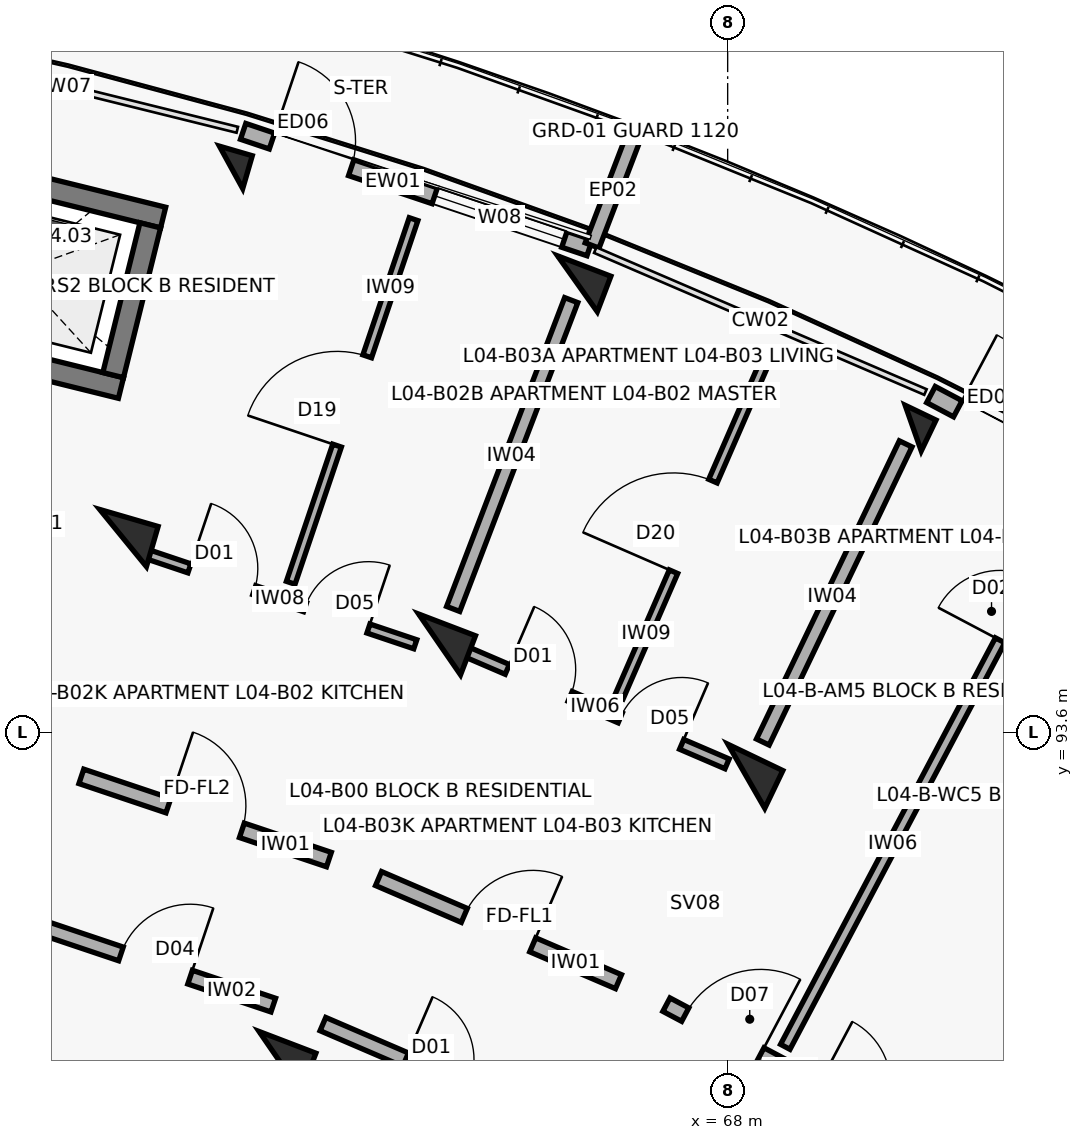
"""IFC4 building model, lengths in metres.
Left out: names, types, materials, properties, quantities, classifications, styles, units other than length and angle.
Written with IfcOpenShell. Run it as: python <this file> out.ifc"""

import sys

from ifc_helpers import new_model, si_unit, direction, frame, frame_2d, origin, origin_2d, place, context, subcontext, project, spatial, rectangle, extrude, element, fill, save


model = new_model("IFC4")
c1 = context("Model", 3, precision=1e-05, world=origin(), true_north=direction((0.0, 1.0)))
c2 = subcontext(c1, "Body", "Model", "MODEL_VIEW")
j1 = project(units=[si_unit("LENGTHUNIT", "METRE"), si_unit("PLANEANGLEUNIT", "RADIAN")], contexts=[c1])
p1 = place(None, origin())
s1 = spatial("IfcSite", under=j1, at=p1, CompositionType="ELEMENT")
p2 = place(p1, origin())
s2 = spatial("IfcBuilding", under=s1, at=p2, CompositionType="ELEMENT")
p3 = place(p2, frame((0.0, 0.0, 14.3)))
s3 = spatial("IfcBuildingStorey", under=s2, at=p3, CompositionType="ELEMENT", Elevation=14.3)
p4 = place(p3, frame((60.046, 96.153, 0.0), z_axis=(0.0, 0.0, 1.0), x_axis=(0.27966144946, 0.96009867914, 0.0)))
e1 = element("IfcColumn", 1, at=p4, inside=s3, PredefinedType="COLUMN", context=c2, shape_type="SweptSolid", body=[
    extrude(rectangle(XDim=0.55, YDim=0.8, at=origin_2d()), origin(), (0.0, 0.0, 1.0), 3.1),
])
p5 = place(p3, frame((61.467, 101.031, 0.0), z_axis=(0.0, 0.0, 1.0), x_axis=(0.27966144946, 0.96009867914, 0.0)))
e2 = element("IfcColumn", 2, at=p5, inside=s3, PredefinedType="COLUMN", context=c2, shape_type="SweptSolid", body=[
    extrude(rectangle(XDim=0.45, YDim=0.45, at=origin_2d()), origin(), (0.0, 0.0, 1.0), 3.1),
])
for number, where, z_axis, x_axis in (
    (3, (62.111, 89.261, 0.0), (0.0, 0.0, 1.0), (0.357, 0.934, 0.0)),
    (4, (64.21, 94.753, 0.0), (0.0, 0.0, 1.0), (0.357, 0.934, 0.0)),
):
    element("IfcColumn", number, at=place(p3, frame(where, z_axis=z_axis, x_axis=x_axis)), inside=s3, PredefinedType="COLUMN", context=c2, shape_type="SweptSolid", body=[
        extrude(rectangle(XDim=0.55, YDim=0.8, at=origin_2d()), origin(), (0.0, 0.0, 1.0), 3.1),
    ])
p6 = place(p3, frame((66.024, 99.499, 0.0), z_axis=(0.0, 0.0, 1.0), x_axis=(0.357064076459, 0.934079892355, 0.0)))
e5 = element("IfcColumn", 5, at=p6, inside=s3, PredefinedType="COLUMN", context=c2, shape_type="SweptSolid", body=[
    extrude(rectangle(XDim=0.5, YDim=0.75, at=origin_2d()), origin(), (0.0, 0.0, 1.0), 3.1),
])
p7 = place(p3, frame((68.246, 93.019, 0.0), z_axis=(0.0, 0.0, 1.0), x_axis=(0.432085748802, 0.901832526405, 0.0)))
e6 = element("IfcColumn", 6, at=p7, inside=s3, PredefinedType="COLUMN", context=c2, shape_type="SweptSolid", body=[
    extrude(rectangle(XDim=0.55, YDim=0.8, at=origin_2d()), origin(), (0.0, 0.0, 1.0), 3.1),
])
p8 = place(p3, frame((70.441, 97.6, 0.0), z_axis=(0.0, 0.0, 1.0), x_axis=(0.432085748802, 0.901832526405, 0.0)))
e7 = element("IfcColumn", 7, at=p8, inside=s3, PredefinedType="COLUMN", context=c2, shape_type="SweptSolid", body=[
    extrude(rectangle(XDim=0.45, YDim=0.45, at=origin_2d()), origin(), (0.0, 0.0, 1.0), 3.1),
])
p9 = place(p3, frame((61.625, 101.504, 0.0), z_axis=(0.0, 0.0, 1.0), x_axis=(0.947867898788, -0.318663531717, 0.0)))
e8 = element("IfcWall", 8, at=p9, inside=s3, PredefinedType="SOLIDWALL", context=c2, shape_type="SweptSolid", body=[
    extrude(rectangle(XDim=4.809, YDim=0.22, at=frame_2d((2.405, 0.0))), origin(), (0.0, 0.0, 1.0), 2.25),
])
p10 = place(p9, frame((0.4, 0.0, 0.0)))
e9 = element("IfcOpeningElement", 9, at=p10, cuts=e8, PredefinedType="OPENING", context=c2, shape_type="SweptSolid", body=[
    extrude(rectangle(XDim=1.1, YDim=2.15, at=frame_2d((0.55, 1.075))), frame((0.0, 0.12, 0.0), z_axis=(0.0, -1.0, 0.0), x_axis=(1.0, 0.0, 0.0)), (0.0, 0.0, 1.0), 0.24),
])
p11 = place(p9, frame((2.659, 0.0, 0.35)))
e10 = element("IfcOpeningElement", 10, at=p11, cuts=e8, PredefinedType="OPENING", context=c2, shape_type="SweptSolid", body=[
    extrude(rectangle(XDim=1.8, YDim=1.65, at=frame_2d((0.9, 0.825))), frame((0.0, 0.12, 0.0), z_axis=(0.0, -1.0, 0.0), x_axis=(1.0, 0.0, 0.0)), (0.0, 0.0, 1.0), 0.24),
])
p12 = place(p3, frame((66.217, 100.003, 0.0), z_axis=(0.0, 0.0, 1.0), x_axis=(0.356957296461, 0.934120703391, 0.0)))
e11 = element("IfcWall", 11, at=p12, inside=s3, PredefinedType="PARAPET", context=c2, shape_type="SweptSolid", body=[
    extrude(rectangle(XDim=1.53, YDim=0.195, at=frame_2d((0.765, 0.0))), origin(), (0.0, 0.0, 1.0), 2.25),
])
p13 = place(p3, frame((70.675, 98.042, 0.0), z_axis=(0.0, 0.0, 1.0), x_axis=(0.883448093208, -0.468529045639, 0.0)))
e12 = element("IfcWall", 12, at=p13, inside=s3, PredefinedType="SOLIDWALL", context=c2, shape_type="SweptSolid", body=[
    extrude(rectangle(XDim=4.809, YDim=0.24, at=frame_2d((2.405, 0.0))), origin(), (0.0, 0.0, 1.0), 2.25),
])
p14 = place(p13, frame((0.4, 0.0, 0.0)))
e13 = element("IfcOpeningElement", 13, at=p14, cuts=e12, PredefinedType="OPENING", context=c2, shape_type="SweptSolid", body=[
    extrude(rectangle(XDim=1.1, YDim=2.15, at=frame_2d((0.55, 1.075))), frame((0.0, 0.13, 0.0), z_axis=(0.0, -1.0, 0.0), x_axis=(1.0, 0.0, 0.0)), (0.0, 0.0, 1.0), 0.26),
])
p15 = place(p13, frame((2.659, 0.0, 0.35)))
e14 = element("IfcOpeningElement", 14, at=p15, cuts=e12, PredefinedType="OPENING", context=c2, shape_type="SweptSolid", body=[
    extrude(rectangle(XDim=1.8, YDim=1.65, at=frame_2d((0.9, 0.825))), frame((0.0, 0.13, 0.0), z_axis=(0.0, -1.0, 0.0), x_axis=(1.0, 0.0, 0.0)), (0.0, 0.0, 1.0), 0.26),
])
p16 = place(p3, frame((60.018, 98.128, 0.0), z_axis=(0.0, 0.0, 1.0), x_axis=(-0.970707542441, 0.240264160972, 0.0)))
e15 = element("IfcWall", 15, at=p16, inside=s3, PredefinedType="SHEAR", context=c2, shape_type="SweptSolid", body=[
    extrude(rectangle(XDim=3.39, YDim=0.28, at=frame_2d((1.695, 0.0))), origin(), (0.0, 0.0, 1.0), 3.1),
])
p17 = place(p16, frame((1.095, 0.0, 0.0)))
e16 = element("IfcOpeningElement", 16, at=p17, cuts=e15, PredefinedType="OPENING", context=c2, shape_type="SweptSolid", body=[
    extrude(rectangle(XDim=1.2, YDim=2.15, at=frame_2d((0.6, 1.075))), frame((0.0, 0.15, 0.0), z_axis=(0.0, -1.0, 0.0), x_axis=(1.0, 0.0, 0.0)), (0.0, 0.0, 1.0), 0.3),
])
p18 = place(p3, frame((60.573, 100.37, 0.0), z_axis=(0.0, 0.0, 1.0), x_axis=(-0.970711699588, 0.240247364777, 0.0)))
e17 = element("IfcWall", 17, at=p18, inside=s3, PredefinedType="SHEAR", context=c2, shape_type="SweptSolid", body=[
    extrude(rectangle(XDim=3.39, YDim=0.28, at=frame_2d((1.695, 0.0))), origin(), (0.0, 0.0, 1.0), 3.1),
])
p19 = place(p3, frame((59.915, 98.297, 0.0), z_axis=(0.0, 0.0, 1.0), x_axis=(0.2402993748, 0.970698825832, 0.0)))
e18 = element("IfcWall", 18, at=p19, inside=s3, PredefinedType="SHEAR", context=c2, shape_type="SweptSolid", body=[
    extrude(rectangle(XDim=2.03, YDim=0.28, at=frame_2d((1.015, 0.0))), origin(), (0.0, 0.0, 1.0), 3.1),
])
p20 = place(p3, frame((59.497, 93.018, 0.0), z_axis=(0.0, 0.0, 1.0), x_axis=(0.947863007629, -0.318678080151, 0.0)))
e19 = element("IfcWall", 19, at=p20, inside=s3, PredefinedType="SOLIDWALL", context=c2, shape_type="SweptSolid", body=[
    extrude(rectangle(XDim=3.436, YDim=0.2, at=frame_2d((1.718, 0.0))), origin(), (0.0, 0.0, 1.0), 2.08),
])
p21 = place(p20, frame((1.208, 0.0, 0.0)))
e20 = element("IfcOpeningElement", 20, at=p21, cuts=e19, PredefinedType="OPENING", context=c2, shape_type="SweptSolid", body=[
    extrude(rectangle(XDim=1.02, YDim=2.15, at=frame_2d((0.51, 1.075))), frame((0.0, 0.11, 0.0), z_axis=(0.0, -1.0, 0.0), x_axis=(1.0, 0.0, 0.0)), (0.0, 0.0, 1.0), 0.22),
])
p22 = place(p3, frame((58.923, 91.049, 0.0), z_axis=(0.0, 0.0, 1.0), x_axis=(0.94787351033, -0.318646839643, 0.0)))
e21 = element("IfcWall", 21, at=p22, inside=s3, PredefinedType="SOLIDWALL", context=c2, shape_type="SweptSolid", body=[
    extrude(rectangle(XDim=3.269, YDim=0.19, at=frame_2d((1.634, 0.0))), origin(), (0.0, 0.0, 1.0), 2.08),
])
p23 = place(p22, frame((1.154, 0.0, 0.0)))
e22 = element("IfcOpeningElement", 22, at=p23, cuts=e21, PredefinedType="OPENING", context=c2, shape_type="SweptSolid", body=[
    extrude(rectangle(XDim=0.96, YDim=2.1, at=frame_2d((0.48, 1.05))), frame((0.0, 0.105, 0.0), z_axis=(0.0, -1.0, 0.0), x_axis=(1.0, 0.0, 0.0)), (0.0, 0.0, 1.0), 0.21),
])
p24 = place(p3, frame((60.302, 95.962, 0.0), z_axis=(0.0, 0.0, 1.0), x_axis=(0.947873924847, -0.318645606584, 0.0)))
e23 = element("IfcWall", 23, at=p24, inside=s3, PredefinedType="PARTITIONING", context=c2, shape_type="SweptSolid", body=[
    extrude(rectangle(XDim=3.785, YDim=0.125, at=frame_2d((1.893, 0.0))), origin(), (0.0, 0.0, 1.0), 2.08),
])
p25 = place(p24, frame((0.65, 0.0, 0.0)))
e24 = element("IfcOpeningElement", 24, at=p25, cuts=e23, PredefinedType="OPENING", context=c2, shape_type="SweptSolid", body=[
    extrude(rectangle(XDim=0.9, YDim=2.1, at=frame_2d((0.45, 1.05))), frame((0.0, 0.073, 0.0), z_axis=(0.0, -1.0, 0.0), x_axis=(1.0, 0.0, 0.0)), (0.0, 0.0, 1.0), 0.145),
])
p26 = place(p24, frame((2.255, 0.0, 0.0)))
e25 = element("IfcOpeningElement", 25, at=p26, cuts=e23, PredefinedType="OPENING", context=c2, shape_type="SweptSolid", body=[
    extrude(rectangle(XDim=0.88, YDim=2.1, at=frame_2d((0.44, 1.05))), frame((0.0, 0.073, 0.0), z_axis=(0.0, -1.0, 0.0), x_axis=(1.0, 0.0, 0.0)), (0.0, 0.0, 1.0), 0.145),
])
p27 = place(p3, frame((62.251, 95.565, 0.0), z_axis=(0.0, 0.0, 1.0), x_axis=(0.32008297059, 0.94738951437, 0.0)))
e26 = element("IfcWall", 26, at=p27, inside=s3, PredefinedType="PARTITIONING", context=c2, shape_type="SweptSolid", body=[
    extrude(rectangle(XDim=5.05, YDim=0.12, at=frame_2d((2.525, 0.0))), origin(), (0.0, 0.0, 1.0), 2.08),
])
p28 = place(p27, frame((1.905, 0.0, 0.0)))
e27 = element("IfcOpeningElement", 27, at=p28, cuts=e26, PredefinedType="OPENING", context=c2, shape_type="SweptSolid", body=[
    extrude(rectangle(XDim=1.24, YDim=2.1, at=frame_2d((0.62, 1.05))), frame((0.0, 0.07, 0.0), z_axis=(0.0, -1.0, 0.0), x_axis=(1.0, 0.0, 0.0)), (0.0, 0.0, 1.0), 0.14),
])
p29 = place(p3, frame((63.407, 91.673, 0.0), z_axis=(0.0, 0.0, 1.0), x_axis=(0.918718172399, -0.394913813008, 0.0)))
e28 = element("IfcWall", 28, at=p29, inside=s3, PredefinedType="SOLIDWALL", context=c2, shape_type="SweptSolid", body=[
    extrude(rectangle(XDim=3.436, YDim=0.2, at=frame_2d((1.718, 0.0))), origin(), (0.0, 0.0, 1.0), 2.08),
])
p30 = place(p29, frame((1.228, 0.0, 0.0)))
e29 = element("IfcOpeningElement", 29, at=p30, cuts=e28, PredefinedType="OPENING", context=c2, shape_type="SweptSolid", body=[
    extrude(rectangle(XDim=0.98, YDim=2.15, at=frame_2d((0.49, 1.075))), frame((0.0, 0.11, 0.0), z_axis=(0.0, -1.0, 0.0), x_axis=(1.0, 0.0, 0.0)), (0.0, 0.0, 1.0), 0.22),
])
p31 = place(p3, frame((62.675, 89.758, 0.0), z_axis=(0.0, 0.0, 1.0), x_axis=(0.918723391052, -0.394901672235, 0.0)))
e30 = element("IfcWall", 30, at=p31, inside=s3, PredefinedType="SOLIDWALL", context=c2, shape_type="SweptSolid", body=[
    extrude(rectangle(XDim=3.269, YDim=0.19, at=frame_2d((1.634, 0.0))), origin(), (0.0, 0.0, 1.0), 2.08),
])
p32 = place(p31, frame((1.184, 0.0, 0.0)))
e31 = element("IfcOpeningElement", 31, at=p32, cuts=e30, PredefinedType="OPENING", context=c2, shape_type="SweptSolid", body=[
    extrude(rectangle(XDim=0.9, YDim=2.1, at=frame_2d((0.45, 1.05))), frame((0.0, 0.105, 0.0), z_axis=(0.0, -1.0, 0.0), x_axis=(1.0, 0.0, 0.0)), (0.0, 0.0, 1.0), 0.21),
])
p33 = place(p3, frame((64.503, 94.682, 0.0), z_axis=(0.0, 0.0, 1.0), x_axis=(0.918732171064, -0.394881245253, 0.0)))
e32 = element("IfcWall", 32, at=p33, inside=s3, PredefinedType="PARTITIONING", context=c2, shape_type="SweptSolid", body=[
    extrude(rectangle(XDim=3.797, YDim=0.14, at=frame_2d((1.899, 0.0))), origin(), (0.0, 0.0, 1.0), 2.08),
])
p34 = place(p33, frame((0.65, 0.0, 0.0)))
e33 = element("IfcOpeningElement", 33, at=p34, cuts=e32, PredefinedType="OPENING", context=c2, shape_type="SweptSolid", body=[
    extrude(rectangle(XDim=0.9, YDim=2.1, at=frame_2d((0.45, 1.05))), frame((0.0, 0.08, 0.0), z_axis=(0.0, -1.0, 0.0), x_axis=(1.0, 0.0, 0.0)), (0.0, 0.0, 1.0), 0.16),
])
p35 = place(p33, frame((2.267, 0.0, 0.0)))
e34 = element("IfcOpeningElement", 34, at=p35, cuts=e32, PredefinedType="OPENING", context=c2, shape_type="SweptSolid", body=[
    extrude(rectangle(XDim=0.88, YDim=2.1, at=frame_2d((0.44, 1.05))), frame((0.0, 0.08, 0.0), z_axis=(0.0, -1.0, 0.0), x_axis=(1.0, 0.0, 0.0)), (0.0, 0.0, 1.0), 0.16),
])
p36 = place(p3, frame((66.569, 94.06, 0.0), z_axis=(0.0, 0.0, 1.0), x_axis=(0.399048563147, 0.916929792433, 0.0)))
e35 = element("IfcWall", 35, at=p36, inside=s3, PredefinedType="PARTITIONING", context=c2, shape_type="SweptSolid", body=[
    extrude(rectangle(XDim=4.9, YDim=0.12, at=frame_2d((2.45, 0.0))), origin(), (0.0, 0.0, 1.0), 2.08),
])
p37 = place(p36, frame((1.8, 0.0, 0.0)))
e36 = element("IfcOpeningElement", 36, at=p37, cuts=e35, PredefinedType="OPENING", context=c2, shape_type="SweptSolid", body=[
    extrude(rectangle(XDim=1.3, YDim=2.1, at=frame_2d((0.65, 1.05))), frame((0.0, 0.07, 0.0), z_axis=(0.0, -1.0, 0.0), x_axis=(1.0, 0.0, 0.0)), (0.0, 0.0, 1.0), 0.14),
])
p38 = place(p3, frame((64.389, 95.22, 0.0), z_axis=(0.0, 0.0, 1.0), x_axis=(0.357064016205, 0.934079915388, 0.0)))
e37 = element("IfcWall", 37, at=p38, inside=s3, PredefinedType="SOLIDWALL", context=c2, shape_type="SweptSolid", body=[
    extrude(rectangle(XDim=4.35, YDim=0.185, at=frame_2d((2.175, 0.0))), origin(), (0.0, 0.0, 1.0), 2.08),
])
p39 = place(p3, frame((67.194, 90.014, 0.0), z_axis=(0.0, 0.0, 1.0), x_axis=(0.883410853063, -0.468599258099, 0.0)))
e38 = element("IfcWall", 38, at=p39, inside=s3, PredefinedType="SOLIDWALL", context=c2, shape_type="SweptSolid", body=[
    extrude(rectangle(XDim=3.436, YDim=0.2, at=frame_2d((1.718, 0.0))), origin(), (0.0, 0.0, 1.0), 2.08),
])
p40 = place(p39, frame((0.28, 0.0, 0.0)))
e39 = element("IfcOpeningElement", 39, at=p40, cuts=e38, PredefinedType="OPENING", context=c2, shape_type="SweptSolid", body=[
    extrude(rectangle(XDim=1.12, YDim=2.15, at=frame_2d((0.56, 1.075))), frame((0.0, 0.11, 0.0), z_axis=(0.0, -1.0, 0.0), x_axis=(1.0, 0.0, 0.0)), (0.0, 0.0, 1.0), 0.22),
])
p41 = place(p39, frame((2.266, 0.0, 0.0)))
e40 = element("IfcOpeningElement", 40, at=p41, cuts=e38, PredefinedType="OPENING", context=c2, shape_type="SweptSolid", body=[
    extrude(rectangle(XDim=0.95, YDim=2.1, at=frame_2d((0.475, 1.05))), frame((0.0, 0.11, 0.0), z_axis=(0.0, -1.0, 0.0), x_axis=(1.0, 0.0, 0.0)), (0.0, 0.0, 1.0), 0.22),
])
p42 = place(p3, frame((68.758, 89.459, 0.0), z_axis=(0.0, 0.0, 1.0), x_axis=(0.467208910392, 0.884146952746, 0.0)))
e41 = element("IfcWall", 41, at=p42, inside=s3, PredefinedType="PARTITIONING", context=c2, shape_type="SweptSolid", body=[
    extrude(rectangle(XDim=7.95, YDim=0.14, at=frame_2d((3.975, 0.0))), origin(), (0.0, 0.0, 1.0), 2.08),
])
p43 = place(p42, frame((6.05, 0.0, 0.0)))
e42 = element("IfcOpeningElement", 42, at=p43, cuts=e41, PredefinedType="OPENING", context=c2, shape_type="SweptSolid", body=[
    extrude(rectangle(XDim=0.92, YDim=2.1, at=frame_2d((0.46, 1.05))), frame((0.0, 0.08, 0.0), z_axis=(0.0, -1.0, 0.0), x_axis=(1.0, 0.0, 0.0)), (0.0, 0.0, 1.0), 0.16),
])
p44 = place(p3, frame((68.462, 93.469, 0.0), z_axis=(0.0, 0.0, 1.0), x_axis=(0.432086898897, 0.901831975371, 0.0)))
e43 = element("IfcWall", 43, at=p44, inside=s3, PredefinedType="SOLIDWALL", context=c2, shape_type="SweptSolid", body=[
    extrude(rectangle(XDim=4.35, YDim=0.185, at=frame_2d((2.175, 0.0))), origin(), (0.0, 0.0, 1.0), 2.08),
])
p45 = place(p10, origin())
e44 = element("IfcDoor", 44, at=p45, inside=s3, OperationType="SINGLE_SWING_LEFT", PredefinedType="DOOR", context=c2, shape_type="SweptSolid", body=[
    extrude(rectangle(XDim=1.1, YDim=2.15, at=frame_2d((0.55, 1.075))), frame((0.0, 0.025, 0.0), z_axis=(0.0, -1.0, 0.0), x_axis=(1.0, 0.0, 0.0)), (0.0, 0.0, 1.0), 0.05),
])
fill(e9, e44)
p46 = place(p11, origin())
e45 = element("IfcWindow", 45, at=p46, inside=s3, PartitioningType="TRIPLE_PANEL_VERTICAL", PredefinedType="WINDOW", context=c2, shape_type="SweptSolid", body=[
    extrude(rectangle(XDim=1.8, YDim=1.65, at=frame_2d((0.9, 0.825))), frame((0.0, 0.03, 0.0), z_axis=(0.0, -1.0, 0.0), x_axis=(1.0, 0.0, 0.0)), (0.0, 0.0, 1.0), 0.06),
])
fill(e10, e45)
p47 = place(p14, origin())
e46 = element("IfcDoor", 46, at=p47, inside=s3, OperationType="SINGLE_SWING_LEFT", PredefinedType="DOOR", context=c2, shape_type="SweptSolid", body=[
    extrude(rectangle(XDim=1.1, YDim=2.15, at=frame_2d((0.55, 1.075))), frame((0.0, 0.025, 0.0), z_axis=(0.0, -1.0, 0.0), x_axis=(1.0, 0.0, 0.0)), (0.0, 0.0, 1.0), 0.05),
])
fill(e13, e46)
p48 = place(p21, origin())
e47 = element("IfcDoor", 47, at=p48, inside=s3, OperationType="SINGLE_SWING_LEFT", PredefinedType="DOOR", context=c2, shape_type="SweptSolid", body=[
    extrude(rectangle(XDim=1.02, YDim=2.15, at=frame_2d((0.51, 1.075))), frame((0.0, 0.025, 0.0), z_axis=(0.0, -1.0, 0.0), x_axis=(1.0, 0.0, 0.0)), (0.0, 0.0, 1.0), 0.05),
])
fill(e20, e47)
p49 = place(p23, origin())
e48 = element("IfcDoor", 48, at=p49, inside=s3, OperationType="SINGLE_SWING_RIGHT", PredefinedType="DOOR", context=c2, shape_type="SweptSolid", body=[
    extrude(rectangle(XDim=0.96, YDim=2.1, at=frame_2d((0.48, 1.05))), frame((0.0, 0.025, 0.0), z_axis=(0.0, -1.0, 0.0), x_axis=(1.0, 0.0, 0.0)), (0.0, 0.0, 1.0), 0.05),
])
fill(e22, e48)
p50 = place(p25, origin())
e49 = element("IfcDoor", 49, at=p50, inside=s3, OperationType="SINGLE_SWING_LEFT", PredefinedType="DOOR", context=c2, shape_type="SweptSolid", body=[
    extrude(rectangle(XDim=0.9, YDim=2.1, at=frame_2d((0.45, 1.05))), frame((0.0, 0.025, 0.0), z_axis=(0.0, -1.0, 0.0), x_axis=(1.0, 0.0, 0.0)), (0.0, 0.0, 1.0), 0.05),
])
fill(e24, e49)
p51 = place(p26, origin())
e50 = element("IfcDoor", 50, at=p51, inside=s3, OperationType="SINGLE_SWING_RIGHT", PredefinedType="DOOR", context=c2, shape_type="SweptSolid", body=[
    extrude(rectangle(XDim=0.88, YDim=2.1, at=frame_2d((0.44, 1.05))), frame((0.0, 0.025, 0.0), z_axis=(0.0, -1.0, 0.0), x_axis=(1.0, 0.0, 0.0)), (0.0, 0.0, 1.0), 0.05),
])
fill(e25, e50)
p52 = place(p28, origin())
e51 = element("IfcDoor", 51, at=p52, inside=s3, OperationType="SINGLE_SWING_LEFT", PredefinedType="DOOR", context=c2, shape_type="SweptSolid", body=[
    extrude(rectangle(XDim=1.24, YDim=2.1, at=frame_2d((0.62, 1.05))), frame((0.0, 0.025, 0.0), z_axis=(0.0, -1.0, 0.0), x_axis=(1.0, 0.0, 0.0)), (0.0, 0.0, 1.0), 0.05),
])
fill(e27, e51)
p53 = place(p30, origin())
e52 = element("IfcDoor", 52, at=p53, inside=s3, OperationType="SINGLE_SWING_RIGHT", PredefinedType="DOOR", context=c2, shape_type="SweptSolid", body=[
    extrude(rectangle(XDim=0.98, YDim=2.15, at=frame_2d((0.49, 1.075))), frame((0.0, 0.025, 0.0), z_axis=(0.0, -1.0, 0.0), x_axis=(1.0, 0.0, 0.0)), (0.0, 0.0, 1.0), 0.05),
])
fill(e29, e52)
p54 = place(p32, origin())
e53 = element("IfcDoor", 53, at=p54, inside=s3, OperationType="SINGLE_SWING_LEFT", PredefinedType="DOOR", context=c2, shape_type="SweptSolid", body=[
    extrude(rectangle(XDim=0.9, YDim=2.1, at=frame_2d((0.45, 1.05))), frame((0.0, 0.025, 0.0), z_axis=(0.0, -1.0, 0.0), x_axis=(1.0, 0.0, 0.0)), (0.0, 0.0, 1.0), 0.05),
])
fill(e31, e53)
p55 = place(p34, origin())
e54 = element("IfcDoor", 54, at=p55, inside=s3, OperationType="SINGLE_SWING_LEFT", PredefinedType="DOOR", context=c2, shape_type="SweptSolid", body=[
    extrude(rectangle(XDim=0.9, YDim=2.1, at=frame_2d((0.45, 1.05))), frame((0.0, 0.025, 0.0), z_axis=(0.0, -1.0, 0.0), x_axis=(1.0, 0.0, 0.0)), (0.0, 0.0, 1.0), 0.05),
])
fill(e33, e54)
p56 = place(p35, origin())
e55 = element("IfcDoor", 55, at=p56, inside=s3, OperationType="SINGLE_SWING_RIGHT", PredefinedType="DOOR", context=c2, shape_type="SweptSolid", body=[
    extrude(rectangle(XDim=0.88, YDim=2.1, at=frame_2d((0.44, 1.05))), frame((0.0, 0.025, 0.0), z_axis=(0.0, -1.0, 0.0), x_axis=(1.0, 0.0, 0.0)), (0.0, 0.0, 1.0), 0.05),
])
fill(e34, e55)
p57 = place(p37, origin())
e56 = element("IfcDoor", 56, at=p57, inside=s3, OperationType="SINGLE_SWING_LEFT", PredefinedType="DOOR", context=c2, shape_type="SweptSolid", body=[
    extrude(rectangle(XDim=1.3, YDim=2.1, at=frame_2d((0.65, 1.05))), frame((0.0, 0.025, 0.0), z_axis=(0.0, -1.0, 0.0), x_axis=(1.0, 0.0, 0.0)), (0.0, 0.0, 1.0), 0.05),
])
fill(e36, e56)
p58 = place(p40, origin())
e57 = element("IfcDoor", 57, at=p58, inside=s3, OperationType="SINGLE_SWING_RIGHT", PredefinedType="DOOR", context=c2, shape_type="SweptSolid", body=[
    extrude(rectangle(XDim=1.12, YDim=2.15, at=frame_2d((0.56, 1.075))), frame((0.0, 0.025, 0.0), z_axis=(0.0, -1.0, 0.0), x_axis=(1.0, 0.0, 0.0)), (0.0, 0.0, 1.0), 0.05),
])
fill(e39, e57)
p59 = place(p43, origin())
e58 = element("IfcDoor", 58, at=p59, inside=s3, OperationType="SINGLE_SWING_LEFT", PredefinedType="DOOR", context=c2, shape_type="SweptSolid", body=[
    extrude(rectangle(XDim=0.92, YDim=2.1, at=frame_2d((0.46, 1.05))), frame((0.0, 0.025, 0.0), z_axis=(0.0, -1.0, 0.0), x_axis=(1.0, 0.0, 0.0)), (0.0, 0.0, 1.0), 0.05),
])
fill(e42, e58)
save(model, sys.argv[1])
